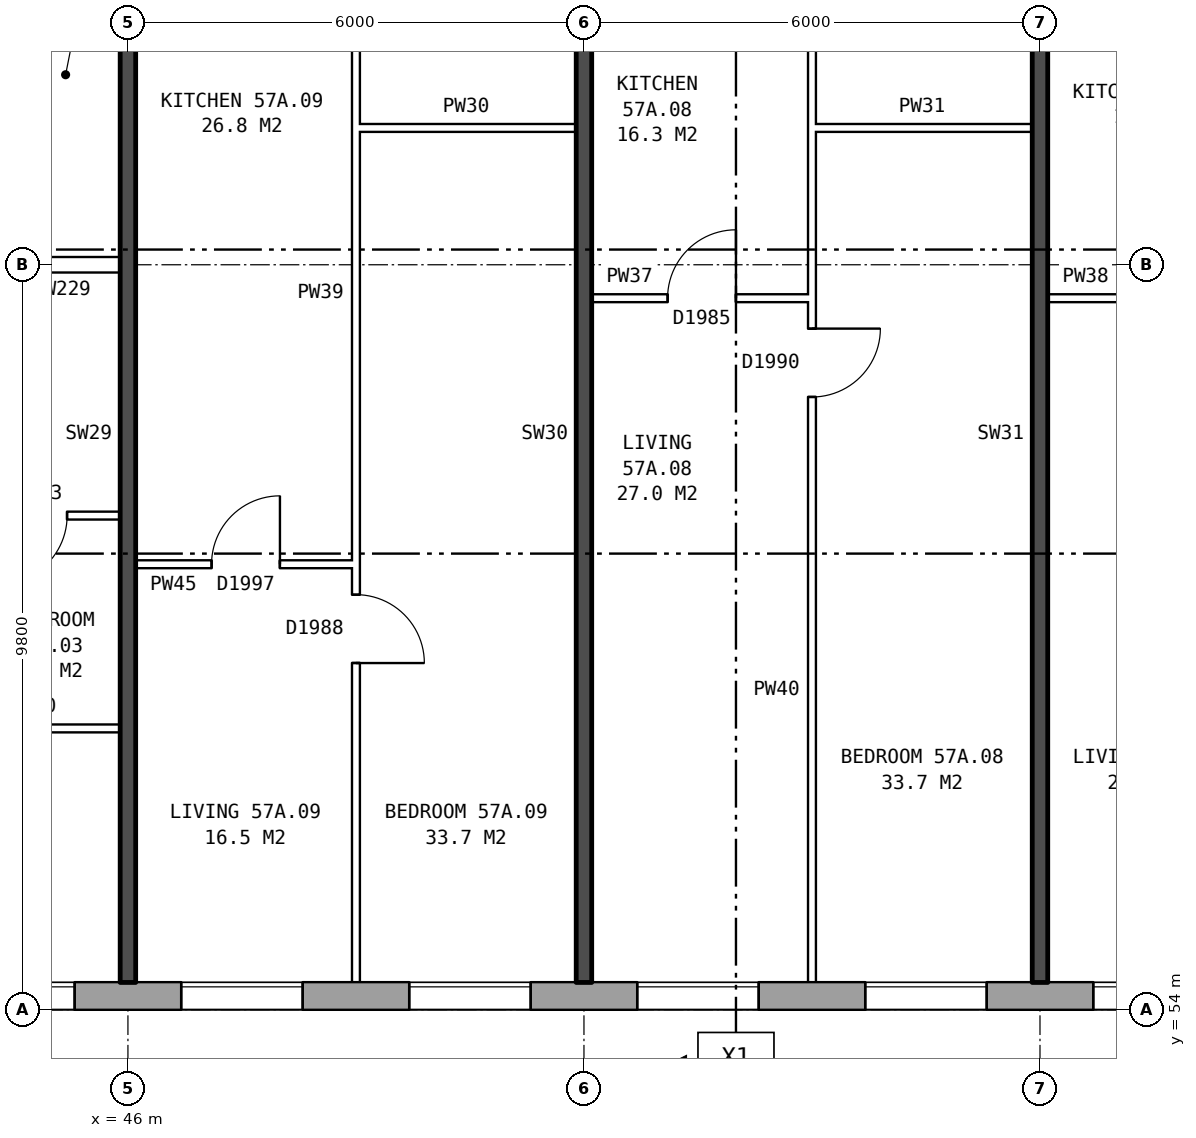
"""IFC4 building model, lengths in metres.
Left out: names, types, materials, properties, quantities, classifications, styles, units other than length and angle.
Written with IfcOpenShell. Run it as: python <this file> out.ifc"""

import sys

from ifc_helpers import new_model, si_unit, direction, frame, frame_2d, origin, place, context, subcontext, project, spatial, rectangle, extrude, element, fill, save


model = new_model("IFC4")
c1 = context("Model", 3, precision=1e-05, world=origin(), true_north=direction((0.0, 1.0)))
c2 = subcontext(c1, "Body", "Model", "MODEL_VIEW")
j1 = project(units=[si_unit("LENGTHUNIT", "METRE"), si_unit("PLANEANGLEUNIT", "RADIAN")], contexts=[c1])
p1 = place(None, origin())
s1 = spatial("IfcSite", under=j1, at=p1, CompositionType="ELEMENT")
p2 = place(p1, origin())
s2 = spatial("IfcBuilding", under=s1, at=p2, CompositionType="ELEMENT")
p3 = place(p2, frame((0.0, 0.0, 202.8)))
s3 = spatial("IfcBuildingStorey", under=s2, at=p3, CompositionType="ELEMENT", Elevation=202.8)
p4 = place(p3, frame((35.075, 54.18, 0.0), z_axis=(0.0, 0.0, 1.0), x_axis=(1.0, 0.0, 0.0)))
e1 = element("IfcWall", 1, at=p4, inside=s3, PredefinedType="STANDARD", context=c2, shape_type="SweptSolid", body=[
    extrude(rectangle(XDim=39.875, YDim=0.36, at=frame_2d((19.938, 0.0))), origin(), (0.0, 0.0, 1.0), 2.85),
])
p5 = place(p4, frame((2.625, 0.0, 0.8)))
e2 = element("IfcOpeningElement", 2, at=p5, cuts=e1, PredefinedType="OPENING", context=c2, shape_type="SweptSolid", body=[
    extrude(rectangle(XDim=1.6, YDim=1.8, at=frame_2d((0.8, 0.9))), frame((0.0, 0.19, 0.0), z_axis=(0.0, -1.0, 0.0), x_axis=(1.0, 0.0, 0.0)), (0.0, 0.0, 1.0), 0.38),
])
p6 = place(p4, frame((5.625, 0.0, 0.8)))
e3 = element("IfcOpeningElement", 3, at=p6, cuts=e1, PredefinedType="OPENING", context=c2, shape_type="SweptSolid", body=[
    extrude(rectangle(XDim=1.6, YDim=1.8, at=frame_2d((0.8, 0.9))), frame((0.0, 0.19, 0.0), z_axis=(0.0, -1.0, 0.0), x_axis=(1.0, 0.0, 0.0)), (0.0, 0.0, 1.0), 0.38),
])
p7 = place(p4, frame((8.625, 0.0, 0.8)))
e4 = element("IfcOpeningElement", 4, at=p7, cuts=e1, PredefinedType="OPENING", context=c2, shape_type="SweptSolid", body=[
    extrude(rectangle(XDim=1.6, YDim=1.8, at=frame_2d((0.8, 0.9))), frame((0.0, 0.19, 0.0), z_axis=(0.0, -1.0, 0.0), x_axis=(1.0, 0.0, 0.0)), (0.0, 0.0, 1.0), 0.38),
])
p8 = place(p4, frame((11.625, 0.0, 0.8)))
e5 = element("IfcOpeningElement", 5, at=p8, cuts=e1, PredefinedType="OPENING", context=c2, shape_type="SweptSolid", body=[
    extrude(rectangle(XDim=1.6, YDim=1.8, at=frame_2d((0.8, 0.9))), frame((0.0, 0.19, 0.0), z_axis=(0.0, -1.0, 0.0), x_axis=(1.0, 0.0, 0.0)), (0.0, 0.0, 1.0), 0.38),
])
p9 = place(p4, frame((14.625, 0.0, 0.8)))
e6 = element("IfcOpeningElement", 6, at=p9, cuts=e1, PredefinedType="OPENING", context=c2, shape_type="SweptSolid", body=[
    extrude(rectangle(XDim=1.6, YDim=1.8, at=frame_2d((0.8, 0.9))), frame((0.0, 0.19, 0.0), z_axis=(0.0, -1.0, 0.0), x_axis=(1.0, 0.0, 0.0)), (0.0, 0.0, 1.0), 0.38),
])
p10 = place(p4, frame((17.625, 0.0, 0.8)))
e7 = element("IfcOpeningElement", 7, at=p10, cuts=e1, PredefinedType="OPENING", context=c2, shape_type="SweptSolid", body=[
    extrude(rectangle(XDim=1.6, YDim=1.8, at=frame_2d((0.8, 0.9))), frame((0.0, 0.19, 0.0), z_axis=(0.0, -1.0, 0.0), x_axis=(1.0, 0.0, 0.0)), (0.0, 0.0, 1.0), 0.38),
])
p11 = place(p4, frame((20.625, 0.0, 0.8)))
e8 = element("IfcOpeningElement", 8, at=p11, cuts=e1, PredefinedType="OPENING", context=c2, shape_type="SweptSolid", body=[
    extrude(rectangle(XDim=1.6, YDim=1.8, at=frame_2d((0.8, 0.9))), frame((0.0, 0.19, 0.0), z_axis=(0.0, -1.0, 0.0), x_axis=(1.0, 0.0, 0.0)), (0.0, 0.0, 1.0), 0.38),
])
p12 = place(p4, frame((23.625, 0.0, 0.8)))
e9 = element("IfcOpeningElement", 9, at=p12, cuts=e1, PredefinedType="OPENING", context=c2, shape_type="SweptSolid", body=[
    extrude(rectangle(XDim=1.6, YDim=1.8, at=frame_2d((0.8, 0.9))), frame((0.0, 0.19, 0.0), z_axis=(0.0, -1.0, 0.0), x_axis=(1.0, 0.0, 0.0)), (0.0, 0.0, 1.0), 0.38),
])
p13 = place(p4, frame((26.625, 0.0, 0.8)))
e10 = element("IfcOpeningElement", 10, at=p13, cuts=e1, PredefinedType="OPENING", context=c2, shape_type="SweptSolid", body=[
    extrude(rectangle(XDim=1.6, YDim=1.8, at=frame_2d((0.8, 0.9))), frame((0.0, 0.19, 0.0), z_axis=(0.0, -1.0, 0.0), x_axis=(1.0, 0.0, 0.0)), (0.0, 0.0, 1.0), 0.38),
])
p14 = place(p4, frame((29.625, 0.0, 0.8)))
e11 = element("IfcOpeningElement", 11, at=p14, cuts=e1, PredefinedType="OPENING", context=c2, shape_type="SweptSolid", body=[
    extrude(rectangle(XDim=1.6, YDim=1.8, at=frame_2d((0.8, 0.9))), frame((0.0, 0.19, 0.0), z_axis=(0.0, -1.0, 0.0), x_axis=(1.0, 0.0, 0.0)), (0.0, 0.0, 1.0), 0.38),
])
p15 = place(p4, frame((32.625, 0.0, 0.8)))
e12 = element("IfcOpeningElement", 12, at=p15, cuts=e1, PredefinedType="OPENING", context=c2, shape_type="SweptSolid", body=[
    extrude(rectangle(XDim=1.6, YDim=1.8, at=frame_2d((0.8, 0.9))), frame((0.0, 0.19, 0.0), z_axis=(0.0, -1.0, 0.0), x_axis=(1.0, 0.0, 0.0)), (0.0, 0.0, 1.0), 0.38),
])
p16 = place(p4, frame((35.625, 0.0, 0.8)))
e13 = element("IfcOpeningElement", 13, at=p16, cuts=e1, PredefinedType="OPENING", context=c2, shape_type="SweptSolid", body=[
    extrude(rectangle(XDim=1.6, YDim=1.8, at=frame_2d((0.8, 0.9))), frame((0.0, 0.19, 0.0), z_axis=(0.0, -1.0, 0.0), x_axis=(1.0, 0.0, 0.0)), (0.0, 0.0, 1.0), 0.38),
])
p17 = place(p3, frame((43.6, 57.7, 0.0), z_axis=(0.0, 0.0, 1.0), x_axis=(1.0, 0.0, 0.0)))
e14 = element("IfcWall", 14, at=p17, inside=s3, PredefinedType="PARTITIONING", context=c2, shape_type="SweptSolid", body=[
    extrude(rectangle(XDim=2.3, YDim=0.1, at=frame_2d((1.15, 0.0))), origin(), (0.0, 0.0, 1.0), 2.85),
])
p18 = place(p3, frame((46.1, 59.86, 0.0), z_axis=(0.0, 0.0, 1.0), x_axis=(1.0, 0.0, 0.0)))
e15 = element("IfcWall", 15, at=p18, inside=s3, PredefinedType="PARTITIONING", context=c2, shape_type="SweptSolid", body=[
    extrude(rectangle(XDim=2.9, YDim=0.1, at=frame_2d((1.45, 0.0))), origin(), (0.0, 0.0, 1.0), 2.85),
])
p19 = place(p18, frame((1.0, 0.0, 0.0)))
e16 = element("IfcOpeningElement", 16, at=p19, cuts=e15, PredefinedType="OPENING", context=c2, shape_type="SweptSolid", body=[
    extrude(rectangle(XDim=0.9, YDim=2.1, at=frame_2d((0.45, 1.05))), frame((0.0, 0.06, 0.0), z_axis=(0.0, -1.0, 0.0), x_axis=(1.0, 0.0, 0.0)), (0.0, 0.0, 1.0), 0.12),
])
p20 = place(p3, frame((40.1, 60.5, 0.0), z_axis=(0.0, 0.0, 1.0), x_axis=(1.0, 0.0, 0.0)))
e17 = element("IfcWall", 17, at=p20, inside=s3, PredefinedType="PARTITIONING", context=c2, shape_type="SweptSolid", body=[
    extrude(rectangle(XDim=5.8, YDim=0.1, at=frame_2d((2.9, 0.0))), origin(), (0.0, 0.0, 1.0), 2.85),
])
p21 = place(p20, frame((1.3, 0.0, 0.0)))
e18 = element("IfcOpeningElement", 18, at=p21, cuts=e17, PredefinedType="OPENING", context=c2, shape_type="SweptSolid", body=[
    extrude(rectangle(XDim=0.9, YDim=2.1, at=frame_2d((0.45, 1.05))), frame((0.0, 0.06, 0.0), z_axis=(0.0, -1.0, 0.0), x_axis=(1.0, 0.0, 0.0)), (0.0, 0.0, 1.0), 0.12),
])
p22 = place(p20, frame((4.2, 0.0, 0.0)))
e19 = element("IfcOpeningElement", 19, at=p22, cuts=e17, PredefinedType="OPENING", context=c2, shape_type="SweptSolid", body=[
    extrude(rectangle(XDim=0.9, YDim=2.1, at=frame_2d((0.45, 1.05))), frame((0.0, 0.06, 0.0), z_axis=(0.0, -1.0, 0.0), x_axis=(1.0, 0.0, 0.0)), (0.0, 0.0, 1.0), 0.12),
])
p23 = place(p3, frame((52.1, 63.36, 0.0), z_axis=(0.0, 0.0, 1.0), x_axis=(1.0, 0.0, 0.0)))
e20 = element("IfcWall", 20, at=p23, inside=s3, PredefinedType="PARTITIONING", context=c2, shape_type="SweptSolid", body=[
    extrude(rectangle(XDim=2.9, YDim=0.1, at=frame_2d((1.45, 0.0))), origin(), (0.0, 0.0, 1.0), 2.85),
])
p24 = place(p23, frame((1.0, 0.0, 0.0)))
e21 = element("IfcOpeningElement", 21, at=p24, cuts=e20, PredefinedType="OPENING", context=c2, shape_type="SweptSolid", body=[
    extrude(rectangle(XDim=0.9, YDim=2.1, at=frame_2d((0.45, 1.05))), frame((0.0, 0.06, 0.0), z_axis=(0.0, -1.0, 0.0), x_axis=(1.0, 0.0, 0.0)), (0.0, 0.0, 1.0), 0.12),
])
p25 = place(p3, frame((58.1, 63.36, 0.0), z_axis=(0.0, 0.0, 1.0), x_axis=(1.0, 0.0, 0.0)))
e22 = element("IfcWall", 22, at=p25, inside=s3, PredefinedType="PARTITIONING", context=c2, shape_type="SweptSolid", body=[
    extrude(rectangle(XDim=2.9, YDim=0.1, at=frame_2d((1.45, 0.0))), origin(), (0.0, 0.0, 1.0), 2.85),
])
p26 = place(p25, frame((1.0, 0.0, 0.0)))
e23 = element("IfcOpeningElement", 23, at=p26, cuts=e22, PredefinedType="OPENING", context=c2, shape_type="SweptSolid", body=[
    extrude(rectangle(XDim=0.9, YDim=2.1, at=frame_2d((0.45, 1.05))), frame((0.0, 0.06, 0.0), z_axis=(0.0, -1.0, 0.0), x_axis=(1.0, 0.0, 0.0)), (0.0, 0.0, 1.0), 0.12),
])
p27 = place(p3, frame((44.36, 63.8, 0.0), z_axis=(0.0, 0.0, 1.0), x_axis=(1.0, 0.0, 0.0)))
e24 = element("IfcWall", 24, at=p27, inside=s3, PredefinedType="PARTITIONING", context=c2, shape_type="SweptSolid", body=[
    extrude(rectangle(XDim=1.54, YDim=0.2, at=frame_2d((0.77, 0.0))), origin(), (0.0, 0.0, 1.0), 2.85),
])
for number, where, z_axis, x_axis in (
    (25, (49.0, 65.6, 0.0), (0.0, 0.0, 1.0), (1.0, 0.0, 0.0)),
    (26, (55.0, 65.6, 0.0), (0.0, 0.0, 1.0), (1.0, 0.0, 0.0)),
):
    element("IfcWall", number, at=place(p3, frame(where, z_axis=z_axis, x_axis=x_axis)), inside=s3, PredefinedType="PARTITIONING", context=c2, shape_type="SweptSolid", body=[
        extrude(rectangle(XDim=2.9, YDim=0.1, at=frame_2d((1.45, 0.0))), origin(), (0.0, 0.0, 1.0), 2.85),
    ])
p28 = place(p3, frame((46.0, 54.36, 0.0), z_axis=(0.0, 0.0, 1.0), x_axis=(0.0, 1.0, 0.0)))
e27 = element("IfcWall", 27, at=p28, inside=s3, PredefinedType="SOLIDWALL", context=c2, shape_type="SweptSolid", body=[
    extrude(rectangle(XDim=14.44, YDim=0.2, at=frame_2d((7.22, 0.0))), origin(), (0.0, 0.0, 1.0), 2.85),
])
p29 = place(p3, frame((49.0, 54.36, 0.0), z_axis=(0.0, 0.0, 1.0), x_axis=(0.0, 1.0, 0.0)))
e28 = element("IfcWall", 28, at=p29, inside=s3, PredefinedType="PARTITIONING", context=c2, shape_type="SweptSolid", body=[
    extrude(rectangle(XDim=14.34, YDim=0.1, at=frame_2d((7.17, 0.0))), origin(), (0.0, 0.0, 1.0), 2.85),
])
p30 = place(p29, frame((4.2, 0.0, 0.0)))
e29 = element("IfcOpeningElement", 29, at=p30, cuts=e28, PredefinedType="OPENING", context=c2, shape_type="SweptSolid", body=[
    extrude(rectangle(XDim=0.9, YDim=2.1, at=frame_2d((0.45, 1.05))), frame((0.0, 0.06, 0.0), z_axis=(0.0, -1.0, 0.0), x_axis=(1.0, 0.0, 0.0)), (0.0, 0.0, 1.0), 0.12),
])
p31 = place(p29, frame((13.04, 0.0, 0.0)))
e30 = element("IfcOpeningElement", 30, at=p31, cuts=e28, PredefinedType="OPENING", context=c2, shape_type="SweptSolid", body=[
    extrude(rectangle(XDim=0.9, YDim=2.1, at=frame_2d((0.45, 1.05))), frame((0.0, 0.06, 0.0), z_axis=(0.0, -1.0, 0.0), x_axis=(1.0, 0.0, 0.0)), (0.0, 0.0, 1.0), 0.12),
])
p32 = place(p3, frame((52.0, 54.36, 0.0), z_axis=(0.0, 0.0, 1.0), x_axis=(0.0, 1.0, 0.0)))
e31 = element("IfcWall", 31, at=p32, inside=s3, PredefinedType="SOLIDWALL", context=c2, shape_type="SweptSolid", body=[
    extrude(rectangle(XDim=14.44, YDim=0.2, at=frame_2d((7.22, 0.0))), origin(), (0.0, 0.0, 1.0), 2.85),
])
p33 = place(p3, frame((55.0, 54.36, 0.0), z_axis=(0.0, 0.0, 1.0), x_axis=(0.0, 1.0, 0.0)))
e32 = element("IfcWall", 32, at=p33, inside=s3, PredefinedType="PARTITIONING", context=c2, shape_type="SweptSolid", body=[
    extrude(rectangle(XDim=14.34, YDim=0.1, at=frame_2d((7.17, 0.0))), origin(), (0.0, 0.0, 1.0), 2.85),
])
p34 = place(p33, frame((7.7, 0.0, 0.0)))
e33 = element("IfcOpeningElement", 33, at=p34, cuts=e32, PredefinedType="OPENING", context=c2, shape_type="SweptSolid", body=[
    extrude(rectangle(XDim=0.9, YDim=2.1, at=frame_2d((0.45, 1.05))), frame((0.0, 0.06, 0.0), z_axis=(0.0, -1.0, 0.0), x_axis=(1.0, 0.0, 0.0)), (0.0, 0.0, 1.0), 0.12),
])
p35 = place(p33, frame((13.04, 0.0, 0.0)))
e34 = element("IfcOpeningElement", 34, at=p35, cuts=e32, PredefinedType="OPENING", context=c2, shape_type="SweptSolid", body=[
    extrude(rectangle(XDim=0.9, YDim=2.1, at=frame_2d((0.45, 1.05))), frame((0.0, 0.06, 0.0), z_axis=(0.0, -1.0, 0.0), x_axis=(1.0, 0.0, 0.0)), (0.0, 0.0, 1.0), 0.12),
])
p36 = place(p3, frame((58.0, 54.36, 0.0), z_axis=(0.0, 0.0, 1.0), x_axis=(0.0, 1.0, 0.0)))
e35 = element("IfcWall", 35, at=p36, inside=s3, PredefinedType="SOLIDWALL", context=c2, shape_type="SweptSolid", body=[
    extrude(rectangle(XDim=14.44, YDim=0.2, at=frame_2d((7.22, 0.0))), origin(), (0.0, 0.0, 1.0), 2.85),
])
p37 = place(p7, origin())
e36 = element("IfcWindow", 36, at=p37, inside=s3, PartitioningType="SINGLE_PANEL", PredefinedType="WINDOW", context=c2, shape_type="SweptSolid", body=[
    extrude(rectangle(XDim=1.6, YDim=1.8, at=frame_2d((0.8, 0.9))), frame((0.0, 0.15, 0.0), z_axis=(0.0, -1.0, 0.0), x_axis=(1.0, 0.0, 0.0)), (0.0, 0.0, 1.0), 0.06),
])
fill(e4, e36)
p38 = place(p8, origin())
e37 = element("IfcWindow", 37, at=p38, inside=s3, PartitioningType="SINGLE_PANEL", PredefinedType="WINDOW", context=c2, shape_type="SweptSolid", body=[
    extrude(rectangle(XDim=1.6, YDim=1.8, at=frame_2d((0.8, 0.9))), frame((0.0, 0.15, 0.0), z_axis=(0.0, -1.0, 0.0), x_axis=(1.0, 0.0, 0.0)), (0.0, 0.0, 1.0), 0.06),
])
fill(e5, e37)
p39 = place(p9, origin())
e38 = element("IfcWindow", 38, at=p39, inside=s3, PartitioningType="SINGLE_PANEL", PredefinedType="WINDOW", context=c2, shape_type="SweptSolid", body=[
    extrude(rectangle(XDim=1.6, YDim=1.8, at=frame_2d((0.8, 0.9))), frame((0.0, 0.15, 0.0), z_axis=(0.0, -1.0, 0.0), x_axis=(1.0, 0.0, 0.0)), (0.0, 0.0, 1.0), 0.06),
])
fill(e6, e38)
p40 = place(p10, origin())
e39 = element("IfcWindow", 39, at=p40, inside=s3, PartitioningType="SINGLE_PANEL", PredefinedType="WINDOW", context=c2, shape_type="SweptSolid", body=[
    extrude(rectangle(XDim=1.6, YDim=1.8, at=frame_2d((0.8, 0.9))), frame((0.0, 0.15, 0.0), z_axis=(0.0, -1.0, 0.0), x_axis=(1.0, 0.0, 0.0)), (0.0, 0.0, 1.0), 0.06),
])
fill(e7, e39)
p41 = place(p11, origin())
e40 = element("IfcWindow", 40, at=p41, inside=s3, PartitioningType="SINGLE_PANEL", PredefinedType="WINDOW", context=c2, shape_type="SweptSolid", body=[
    extrude(rectangle(XDim=1.6, YDim=1.8, at=frame_2d((0.8, 0.9))), frame((0.0, 0.15, 0.0), z_axis=(0.0, -1.0, 0.0), x_axis=(1.0, 0.0, 0.0)), (0.0, 0.0, 1.0), 0.06),
])
fill(e8, e40)
p42 = place(p12, origin())
e41 = element("IfcWindow", 41, at=p42, inside=s3, PartitioningType="SINGLE_PANEL", PredefinedType="WINDOW", context=c2, shape_type="SweptSolid", body=[
    extrude(rectangle(XDim=1.6, YDim=1.8, at=frame_2d((0.8, 0.9))), frame((0.0, 0.15, 0.0), z_axis=(0.0, -1.0, 0.0), x_axis=(1.0, 0.0, 0.0)), (0.0, 0.0, 1.0), 0.06),
])
fill(e9, e41)
p43 = place(p22, frame((0.9, 0.0, 0.0), z_axis=(0.0, 0.0, 1.0), x_axis=(-1.0, 0.0, 0.0)))
e42 = element("IfcDoor", 42, at=p43, inside=s3, OperationType="SINGLE_SWING_RIGHT", PredefinedType="DOOR", context=c2, shape_type="SweptSolid", body=[
    extrude(rectangle(XDim=0.9, YDim=2.1, at=frame_2d((0.45, 1.05))), frame((0.0, 0.025, 0.0), z_axis=(0.0, -1.0, 0.0), x_axis=(1.0, 0.0, 0.0)), (0.0, 0.0, 1.0), 0.05),
])
fill(e19, e42)
p44 = place(p34, frame((0.9, 0.0, 0.0), z_axis=(0.0, 0.0, 1.0), x_axis=(-1.0, 0.0, 0.0)))
e43 = element("IfcDoor", 43, at=p44, inside=s3, OperationType="SINGLE_SWING_LEFT", PredefinedType="DOOR", context=c2, shape_type="SweptSolid", body=[
    extrude(rectangle(XDim=0.9, YDim=2.1, at=frame_2d((0.45, 1.05))), frame((0.0, 0.025, 0.0), z_axis=(0.0, -1.0, 0.0), x_axis=(1.0, 0.0, 0.0)), (0.0, 0.0, 1.0), 0.05),
])
fill(e33, e43)
p45 = place(p24, origin())
e44 = element("IfcDoor", 44, at=p45, inside=s3, OperationType="SINGLE_SWING_RIGHT", PredefinedType="DOOR", context=c2, shape_type="SweptSolid", body=[
    extrude(rectangle(XDim=0.9, YDim=2.1, at=frame_2d((0.45, 1.05))), frame((0.0, 0.025, 0.0), z_axis=(0.0, -1.0, 0.0), x_axis=(1.0, 0.0, 0.0)), (0.0, 0.0, 1.0), 0.05),
])
fill(e21, e44)
p46 = place(p30, frame((0.9, 0.0, 0.0), z_axis=(0.0, 0.0, 1.0), x_axis=(-1.0, 0.0, 0.0)))
e45 = element("IfcDoor", 45, at=p46, inside=s3, OperationType="SINGLE_SWING_RIGHT", PredefinedType="DOOR", context=c2, shape_type="SweptSolid", body=[
    extrude(rectangle(XDim=0.9, YDim=2.1, at=frame_2d((0.45, 1.05))), frame((0.0, 0.025, 0.0), z_axis=(0.0, -1.0, 0.0), x_axis=(1.0, 0.0, 0.0)), (0.0, 0.0, 1.0), 0.05),
])
fill(e29, e45)
p47 = place(p19, origin())
e46 = element("IfcDoor", 46, at=p47, inside=s3, OperationType="SINGLE_SWING_RIGHT", PredefinedType="DOOR", context=c2, shape_type="SweptSolid", body=[
    extrude(rectangle(XDim=0.9, YDim=2.1, at=frame_2d((0.45, 1.05))), frame((0.0, 0.025, 0.0), z_axis=(0.0, -1.0, 0.0), x_axis=(1.0, 0.0, 0.0)), (0.0, 0.0, 1.0), 0.05),
])
fill(e16, e46)
save(model, sys.argv[1])
